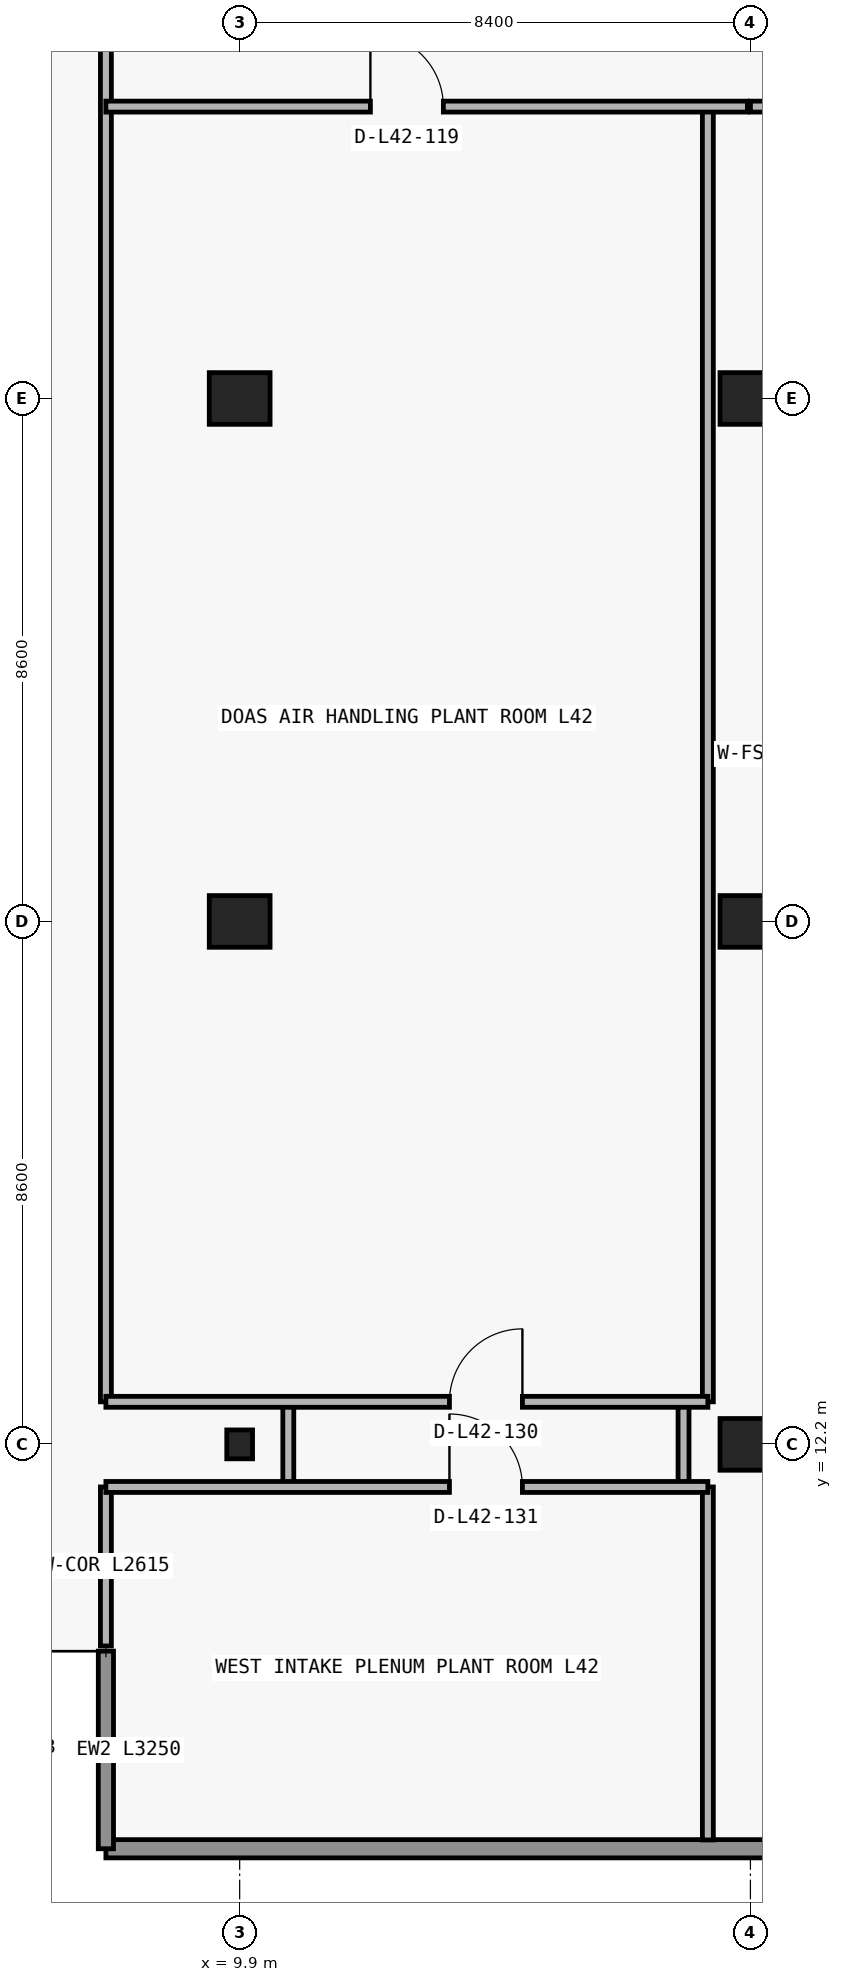
"""IFC4 building model, lengths in metres.
Left out: names, types, materials, properties, quantities, classifications, styles, units other than length and angle.
Written with IfcOpenShell. Run it as: python <this file> out.ifc"""

import sys

from ifc_helpers import new_model, si_unit, direction, frame, frame_2d, origin, origin_2d, place, context, subcontext, project, spatial, rectangle, i_section, extrude, element, fill, save


model = new_model("IFC4")
c1 = context("Model", 3, precision=1e-05, world=origin(), true_north=direction((0.0, 1.0)))
c2 = subcontext(c1, "Body", "Model", "MODEL_VIEW")
j1 = project(units=[si_unit("LENGTHUNIT", "METRE"), si_unit("PLANEANGLEUNIT", "RADIAN")], contexts=[c1])
p1 = place(None, origin())
s1 = spatial("IfcSite", under=j1, at=p1, CompositionType="ELEMENT")
p2 = place(p1, origin())
s2 = spatial("IfcBuilding", under=s1, at=p2, CompositionType="ELEMENT")
p3 = place(p2, frame((0.0, 0.0, 152.1)))
s3 = spatial("IfcBuildingStorey", under=s2, at=p3, CompositionType="ELEMENT", Elevation=152.1)
p4 = place(p3, frame((9.9, 12.2, 0.0), z_axis=(0.0, 0.0, 1.0), x_axis=(1.0, 0.0, 0.0)))
e1 = element("IfcColumn", 1, at=p4, inside=s3, PredefinedType="COLUMN", context=c2, shape_type="SweptSolid", body=[
    extrude(i_section(OverallWidth=0.424, OverallDepth=0.475, WebThickness=0.048, FlangeThickness=0.077, FilletRadius=0.015, at=origin_2d()), origin(), (0.0, 0.0, 1.0), 4.85),
])
for number, where, z_axis, x_axis in (
    (2, (18.3, 12.2, 0.0), (0.0, 0.0, 1.0), (1.0, 0.0, 0.0)),
    (3, (9.9, 20.8, 0.0), (0.0, 0.0, 1.0), (1.0, 0.0, 0.0)),
    (4, (18.3, 20.8, 0.0), (0.0, 0.0, 1.0), (1.0, 0.0, 0.0)),
    (5, (9.9, 29.4, 0.0), (0.0, 0.0, 1.0), (1.0, 0.0, 0.0)),
    (6, (18.3, 29.4, 0.0), (0.0, 0.0, 1.0), (1.0, 0.0, 0.0)),
):
    element("IfcColumn", number, at=place(p3, frame(where, z_axis=z_axis, x_axis=x_axis)), inside=s3, PredefinedType="COLUMN", context=c2, shape_type="SweptSolid", body=[
        extrude(rectangle(XDim=1.0, YDim=0.85, at=origin_2d()), origin(), (0.0, 0.0, 1.0), 4.85),
    ])
p5 = place(p3, frame((70.1, 5.55, 0.0), z_axis=(0.0, 0.0, 1.0), x_axis=(-1.0, 0.0, 0.0)))
e7 = element("IfcWall", 7, at=p5, inside=s3, PredefinedType="STANDARD", context=c2, shape_type="SweptSolid", body=[
    extrude(rectangle(XDim=62.4, YDim=0.3, at=frame_2d((31.2, 0.0))), origin(), (0.0, 0.0, 1.0), 4.85),
])
p6 = place(p3, frame((7.7, 8.8, 0.0), z_axis=(0.0, 0.0, 1.0), x_axis=(0.0, -1.0, 0.0)))
e8 = element("IfcWall", 8, at=p6, inside=s3, PredefinedType="ELEMENTEDWALL", context=c2, shape_type="SweptSolid", body=[
    extrude(rectangle(XDim=3.25, YDim=0.25, at=frame_2d((1.625, 0.0))), origin(), (0.0, 0.0, 1.0), 4.85),
])
p7 = place(p3, frame((7.7, 8.885, 0.0), z_axis=(0.0, 0.0, 1.0), x_axis=(0.0, 1.0, 0.0)))
e9 = element("IfcWall", 9, at=p7, inside=s3, PredefinedType="PARTITIONING", context=c2, shape_type="SweptSolid", body=[
    extrude(rectangle(XDim=2.615, YDim=0.18, at=frame_2d((1.308, 0.0))), origin(), (0.0, 0.0, 1.0), 4.85),
])
p8 = place(p3, frame((7.7, 12.9, 0.0), z_axis=(0.0, 0.0, 1.0), x_axis=(0.0, 1.0, 0.0)))
e10 = element("IfcWall", 10, at=p8, inside=s3, PredefinedType="PARTITIONING", context=c2, shape_type="SweptSolid", body=[
    extrude(rectangle(XDim=34.18, YDim=0.18, at=frame_2d((17.09, 0.0))), origin(), (0.0, 0.0, 1.0), 4.85),
])
for number, where, z_axis, x_axis in (
    (11, (10.7, 11.5, 0.0), (0.0, 0.0, 1.0), (0.0, 1.0, 0.0)),
    (12, (17.2, 11.5, 0.0), (0.0, 0.0, 1.0), (0.0, 1.0, 0.0)),
):
    element("IfcWall", number, at=place(p3, frame(where, z_axis=z_axis, x_axis=x_axis)), inside=s3, PredefinedType="PARTITIONING", context=c2, shape_type="SweptSolid", body=[
        extrude(rectangle(XDim=1.4, YDim=0.18, at=frame_2d((0.7, 0.0))), origin(), (0.0, 0.0, 1.0), 4.85),
    ])
p9 = place(p3, frame((17.6, 5.695, 0.0), z_axis=(0.0, 0.0, 1.0), x_axis=(0.0, 1.0, 0.0)))
e13 = element("IfcWall", 13, at=p9, inside=s3, PredefinedType="PARTITIONING", context=c2, shape_type="SweptSolid", body=[
    extrude(rectangle(XDim=5.805, YDim=0.18, at=frame_2d((2.902, 0.0))), origin(), (0.0, 0.0, 1.0), 4.85),
])
p10 = place(p3, frame((17.6, 12.9, 0.0), z_axis=(0.0, 0.0, 1.0), x_axis=(0.0, 1.0, 0.0)))
e14 = element("IfcWall", 14, at=p10, inside=s3, PredefinedType="PARTITIONING", context=c2, shape_type="SweptSolid", body=[
    extrude(rectangle(XDim=21.3, YDim=0.18, at=frame_2d((10.65, 0.0))), origin(), (0.0, 0.0, 1.0), 4.85),
])
p11 = place(p3, frame((7.7, 11.5, 0.0), z_axis=(0.0, 0.0, 1.0), x_axis=(1.0, 0.0, 0.0)))
e15 = element("IfcWall", 15, at=p11, inside=s3, PredefinedType="PARTITIONING", context=c2, shape_type="SweptSolid", body=[
    extrude(rectangle(XDim=9.9, YDim=0.18, at=frame_2d((4.95, 0.0))), origin(), (0.0, 0.0, 1.0), 4.85),
])
p12 = place(p11, frame((5.65, 0.0, 0.0)))
e16 = element("IfcOpeningElement", 16, at=p12, cuts=e15, PredefinedType="OPENING", context=c2, shape_type="SweptSolid", body=[
    extrude(rectangle(XDim=1.2, YDim=2.2, at=frame_2d((0.6, 1.1))), frame((0.0, 0.1, 0.0), z_axis=(0.0, -1.0, 0.0), x_axis=(1.0, 0.0, 0.0)), (0.0, 0.0, 1.0), 0.2),
])
p13 = place(p3, frame((7.7, 12.9, 0.0), z_axis=(0.0, 0.0, 1.0), x_axis=(1.0, 0.0, 0.0)))
e17 = element("IfcWall", 17, at=p13, inside=s3, PredefinedType="PARTITIONING", context=c2, shape_type="SweptSolid", body=[
    extrude(rectangle(XDim=9.9, YDim=0.18, at=frame_2d((4.95, 0.0))), origin(), (0.0, 0.0, 1.0), 4.85),
])
p14 = place(p13, frame((5.65, 0.0, 0.0)))
e18 = element("IfcOpeningElement", 18, at=p14, cuts=e17, PredefinedType="OPENING", context=c2, shape_type="SweptSolid", body=[
    extrude(rectangle(XDim=1.2, YDim=2.2, at=frame_2d((0.6, 1.1))), frame((0.0, 0.1, 0.0), z_axis=(0.0, -1.0, 0.0), x_axis=(1.0, 0.0, 0.0)), (0.0, 0.0, 1.0), 0.2),
])
p15 = place(p3, frame((7.7, 34.2, 0.0), z_axis=(0.0, 0.0, 1.0), x_axis=(1.0, 0.0, 0.0)))
e19 = element("IfcWall", 19, at=p15, inside=s3, PredefinedType="PARTITIONING", context=c2, shape_type="SweptSolid", body=[
    extrude(rectangle(XDim=10.55, YDim=0.18, at=frame_2d((5.275, 0.0))), origin(), (0.0, 0.0, 1.0), 4.85),
])
p16 = place(p15, frame((4.35, 0.0, 0.0)))
e20 = element("IfcOpeningElement", 20, at=p16, cuts=e19, PredefinedType="OPENING", context=c2, shape_type="SweptSolid", body=[
    extrude(rectangle(XDim=1.2, YDim=2.2, at=frame_2d((0.6, 1.1))), frame((0.0, 0.1, 0.0), z_axis=(0.0, -1.0, 0.0), x_axis=(1.0, 0.0, 0.0)), (0.0, 0.0, 1.0), 0.2),
])
p17 = place(p3, frame((18.3, 34.2, 0.0), z_axis=(0.0, 0.0, 1.0), x_axis=(1.0, 0.0, 0.0)))
e21 = element("IfcWall", 21, at=p17, inside=s3, PredefinedType="PARTITIONING", context=c2, shape_type="SweptSolid", body=[
    extrude(rectangle(XDim=0.7, YDim=0.18, at=frame_2d((0.35, 0.0))), origin(), (0.0, 0.0, 1.0), 4.85),
])
p18 = place(p16, origin())
e22 = element("IfcDoor", 22, at=p18, inside=s3, OperationType="SINGLE_SWING_LEFT", PredefinedType="DOOR", context=c2, shape_type="SweptSolid", body=[
    extrude(rectangle(XDim=1.2, YDim=2.2, at=frame_2d((0.6, 1.1))), frame((0.0, 0.025, 0.0), z_axis=(0.0, -1.0, 0.0), x_axis=(1.0, 0.0, 0.0)), (0.0, 0.0, 1.0), 0.05),
])
fill(e20, e22)
p19 = place(p14, origin())
e23 = element("IfcDoor", 23, at=p19, inside=s3, OperationType="SINGLE_SWING_RIGHT", PredefinedType="DOOR", context=c2, shape_type="SweptSolid", body=[
    extrude(rectangle(XDim=1.2, YDim=2.2, at=frame_2d((0.6, 1.1))), frame((0.0, 0.025, 0.0), z_axis=(0.0, -1.0, 0.0), x_axis=(1.0, 0.0, 0.0)), (0.0, 0.0, 1.0), 0.05),
])
fill(e18, e23)
p20 = place(p12, origin())
e24 = element("IfcDoor", 24, at=p20, inside=s3, OperationType="SINGLE_SWING_LEFT", PredefinedType="DOOR", context=c2, shape_type="SweptSolid", body=[
    extrude(rectangle(XDim=1.2, YDim=2.2, at=frame_2d((0.6, 1.1))), frame((0.0, 0.025, 0.0), z_axis=(0.0, -1.0, 0.0), x_axis=(1.0, 0.0, 0.0)), (0.0, 0.0, 1.0), 0.05),
])
fill(e16, e24)
save(model, sys.argv[1])
